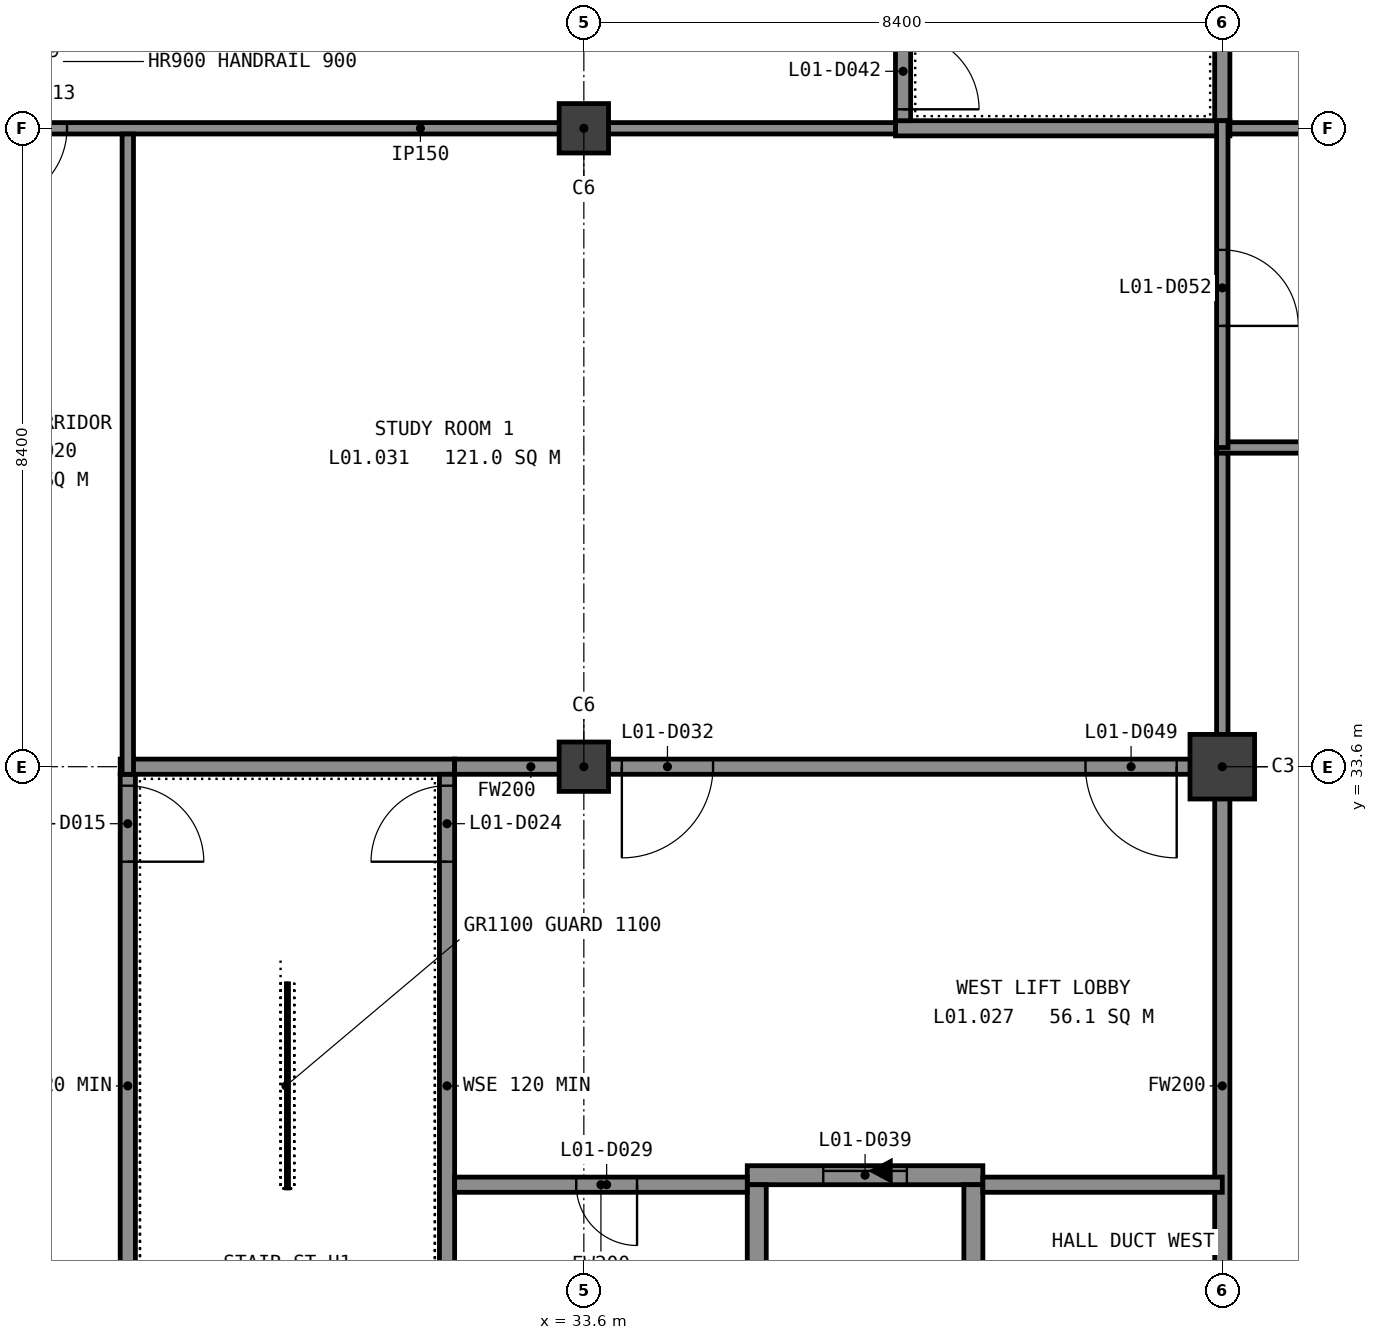
"""IFC4 building model, lengths in metres.
Left out: names, types, materials, properties, quantities, classifications, styles, units other than length and angle.
Written with IfcOpenShell. Run it as: python <this file> out.ifc"""

import sys

from ifc_helpers import new_model, si_unit, direction, frame, frame_2d, origin, origin_2d, place, context, subcontext, project, spatial, rectangle, extrude, element, fill, save


model = new_model("IFC4")
c1 = context("Model", 3, precision=1e-05, world=origin(), true_north=direction((0.0, 1.0)))
c2 = subcontext(c1, "Body", "Model", "MODEL_VIEW")
j1 = project(units=[si_unit("LENGTHUNIT", "METRE"), si_unit("PLANEANGLEUNIT", "RADIAN")], contexts=[c1])
p1 = place(None, origin())
s1 = spatial("IfcSite", under=j1, at=p1, CompositionType="ELEMENT")
p2 = place(p1, origin())
s2 = spatial("IfcBuilding", under=s1, at=p2, CompositionType="ELEMENT")
p3 = place(p2, frame((0.0, 0.0, 5.4)))
s3 = spatial("IfcBuildingStorey", under=s2, at=p3, CompositionType="ELEMENT", Elevation=5.4)
for number, where, z_axis, x_axis in (
    (1, (33.6, 33.6, -0.3), (0.0, 0.0, 1.0), (1.0, 0.0, 0.0)),
    (2, (33.6, 42.0, -0.3), (0.0, 0.0, 1.0), (1.0, 0.0, 0.0)),
):
    element("IfcColumn", number, at=place(p3, frame(where, z_axis=z_axis, x_axis=x_axis)), inside=s3, PredefinedType="COLUMN", context=c2, shape_type="SweptSolid", body=[
        extrude(rectangle(XDim=0.65, YDim=0.65, at=origin_2d()), origin(), (0.0, 0.0, 1.0), 4.55),
    ])
p4 = place(p3, frame((42.0, 33.6, -0.3), z_axis=(0.0, 0.0, 1.0), x_axis=(1.0, 0.0, 0.0)))
e3 = element("IfcColumn", 3, at=p4, inside=s3, PredefinedType="COLUMN", context=c2, shape_type="SweptSolid", body=[
    extrude(rectangle(XDim=0.85, YDim=0.85, at=origin_2d()), origin(), (0.0, 0.0, 1.0), 4.55),
])
p5 = place(p3, frame((35.75, 28.225, -0.3), z_axis=(0.0, 0.0, 1.0), x_axis=(1.0, 0.0, 0.0)))
e4 = element("IfcWall", 4, at=p5, inside=s3, PredefinedType="SHEAR", context=c2, shape_type="SweptSolid", body=[
    extrude(rectangle(XDim=3.1, YDim=0.25, at=frame_2d((1.55, 0.0))), origin(), (0.0, 0.0, 1.0), 4.55),
])
p6 = place(p5, frame((1.0, 0.0, 0.3)))
e5 = element("IfcOpeningElement", 5, at=p6, cuts=e4, PredefinedType="OPENING", context=c2, shape_type="SweptSolid", body=[
    extrude(rectangle(XDim=1.1, YDim=2.1, at=frame_2d((0.55, 1.05))), frame((0.0, 0.135, 0.0), z_axis=(0.0, -1.0, 0.0), x_axis=(1.0, 0.0, 0.0)), (0.0, 0.0, 1.0), 0.27),
])
for number, where, z_axis, x_axis in (
    (6, (35.875, 25.2, -0.3), (0.0, 0.0, 1.0), (0.0, 1.0, 0.0)),
    (7, (38.725, 25.2, -0.3), (0.0, 0.0, 1.0), (0.0, 1.0, 0.0)),
):
    element("IfcWall", number, at=place(p3, frame(where, z_axis=z_axis, x_axis=x_axis)), inside=s3, PredefinedType="SHEAR", context=c2, shape_type="SweptSolid", body=[
        extrude(rectangle(XDim=2.9, YDim=0.25, at=frame_2d((1.45, 0.0))), origin(), (0.0, 0.0, 1.0), 4.55),
    ])
p7 = place(p3, frame((27.5, 33.6, -0.3), z_axis=(0.0, 0.0, 1.0), x_axis=(1.0, 0.0, 0.0)))
e8 = element("IfcWall", 8, at=p7, inside=s3, PredefinedType="SHEAR", context=c2, shape_type="SweptSolid", body=[
    extrude(rectangle(XDim=4.4, YDim=0.2, at=frame_2d((2.2, 0.0))), origin(), (0.0, 0.0, 1.0), 4.5),
])
p8 = place(p3, frame((27.6, 25.3, -0.3), z_axis=(0.0, 0.0, 1.0), x_axis=(0.0, 1.0, 0.0)))
e9 = element("IfcWall", 9, at=p8, inside=s3, PredefinedType="SHEAR", context=c2, shape_type="SweptSolid", body=[
    extrude(rectangle(XDim=8.2, YDim=0.2, at=frame_2d((4.1, 0.0))), origin(), (0.0, 0.0, 1.0), 4.5),
])
p9 = place(p8, frame((7.05, 0.0, 0.3)))
e10 = element("IfcOpeningElement", 10, at=p9, cuts=e9, PredefinedType="OPENING", context=c2, shape_type="SweptSolid", body=[
    extrude(rectangle(XDim=1.0, YDim=2.1, at=frame_2d((0.5, 1.05))), frame((0.0, 0.11, 0.0), z_axis=(0.0, -1.0, 0.0), x_axis=(1.0, 0.0, 0.0)), (0.0, 0.0, 1.0), 0.22),
])
p10 = place(p3, frame((31.8, 25.3, -0.3), z_axis=(0.0, 0.0, 1.0), x_axis=(0.0, 1.0, 0.0)))
e11 = element("IfcWall", 11, at=p10, inside=s3, PredefinedType="SHEAR", context=c2, shape_type="SweptSolid", body=[
    extrude(rectangle(XDim=8.2, YDim=0.2, at=frame_2d((4.1, 0.0))), origin(), (0.0, 0.0, 1.0), 4.5),
])
p11 = place(p10, frame((7.05, 0.0, 0.3)))
e12 = element("IfcOpeningElement", 12, at=p11, cuts=e11, PredefinedType="OPENING", context=c2, shape_type="SweptSolid", body=[
    extrude(rectangle(XDim=1.0, YDim=2.1, at=frame_2d((0.5, 1.05))), frame((0.0, 0.11, 0.0), z_axis=(0.0, -1.0, 0.0), x_axis=(1.0, 0.0, 0.0)), (0.0, 0.0, 1.0), 0.22),
])
p12 = place(p3, frame((37.7, 42.0, -0.3), z_axis=(0.0, 0.0, 1.0), x_axis=(1.0, 0.0, 0.0)))
e13 = element("IfcWall", 13, at=p12, inside=s3, PredefinedType="SHEAR", context=c2, shape_type="SweptSolid", body=[
    extrude(rectangle(XDim=4.4, YDim=0.2, at=frame_2d((2.2, 0.0))), origin(), (0.0, 0.0, 1.0), 4.5),
])
p13 = place(p3, frame((37.8, 42.1, -0.3), z_axis=(0.0, 0.0, 1.0), x_axis=(0.0, 1.0, 0.0)))
e14 = element("IfcWall", 14, at=p13, inside=s3, PredefinedType="SHEAR", context=c2, shape_type="SweptSolid", body=[
    extrude(rectangle(XDim=7.925, YDim=0.2, at=frame_2d((3.962, 0.0))), origin(), (0.0, 0.0, 1.0), 4.5),
])
p14 = place(p13, frame((0.15, 0.0, 0.3)))
e15 = element("IfcOpeningElement", 15, at=p14, cuts=e14, PredefinedType="OPENING", context=c2, shape_type="SweptSolid", body=[
    extrude(rectangle(XDim=1.0, YDim=2.1, at=frame_2d((0.5, 1.05))), frame((0.0, 0.11, 0.0), z_axis=(0.0, -1.0, 0.0), x_axis=(1.0, 0.0, 0.0)), (0.0, 0.0, 1.0), 0.22),
])
p15 = place(p3, frame((42.0, 42.1, -0.3), z_axis=(0.0, 0.0, 1.0), x_axis=(0.0, 1.0, 0.0)))
e16 = element("IfcWall", 16, at=p15, inside=s3, PredefinedType="SHEAR", context=c2, shape_type="SweptSolid", body=[
    extrude(rectangle(XDim=7.925, YDim=0.2, at=frame_2d((3.962, 0.0))), origin(), (0.0, 0.0, 1.0), 4.5),
])
p16 = place(p3, frame((41.925, 37.8, -0.3), z_axis=(0.0, 0.0, 1.0), x_axis=(1.0, 0.0, 0.0)))
e17 = element("IfcWall", 17, at=p16, inside=s3, PredefinedType="PARTITIONING", context=c2, shape_type="SweptSolid", body=[
    extrude(rectangle(XDim=42.15, YDim=0.15, at=frame_2d((21.075, 0.0))), origin(), (0.0, 0.0, 1.0), 4.5),
])
p17 = place(p3, frame((42.1, 42.0, -0.3), z_axis=(0.0, 0.0, 1.0), x_axis=(1.0, 0.0, 0.0)))
e18 = element("IfcWall", 18, at=p17, inside=s3, PredefinedType="PARTITIONING", context=c2, shape_type="SweptSolid", body=[
    extrude(rectangle(XDim=41.9, YDim=0.15, at=frame_2d((20.95, 0.0))), origin(), (0.0, 0.0, 1.0), 4.5),
])
p18 = place(p3, frame((42.0, 25.3, -0.3), z_axis=(0.0, 0.0, 1.0), x_axis=(0.0, 1.0, 0.0)))
e19 = element("IfcWall", 19, at=p18, inside=s3, PredefinedType="SOLIDWALL", context=c2, shape_type="SweptSolid", body=[
    extrude(rectangle(XDim=8.2, YDim=0.2, at=frame_2d((4.1, 0.0))), origin(), (0.0, 0.0, 1.0), 3.9),
])
p19 = place(p3, frame((42.0, 33.7, -0.3), z_axis=(0.0, 0.0, 1.0), x_axis=(0.0, 1.0, 0.0)))
e20 = element("IfcWall", 20, at=p19, inside=s3, PredefinedType="PARTITIONING", context=c2, shape_type="SweptSolid", body=[
    extrude(rectangle(XDim=4.025, YDim=0.15, at=frame_2d((2.013, 0.0))), origin(), (0.0, 0.0, 1.0), 4.5),
])
p20 = place(p3, frame((31.9, 28.1, 0.0), z_axis=(0.0, 0.0, 1.0), x_axis=(1.0, 0.0, 0.0)))
e21 = element("IfcWall", 21, at=p20, inside=s3, PredefinedType="SOLIDWALL", context=c2, shape_type="SweptSolid", body=[
    extrude(rectangle(XDim=3.85, YDim=0.2, at=frame_2d((1.925, 0.0))), origin(), (0.0, 0.0, 1.0), 4.2),
])
p21 = place(p20, frame((1.6, 0.0, 0.0)))
e22 = element("IfcOpeningElement", 22, at=p21, cuts=e21, PredefinedType="OPENING", context=c2, shape_type="SweptSolid", body=[
    extrude(rectangle(XDim=0.8, YDim=2.1, at=frame_2d((0.4, 1.05))), frame((0.0, 0.11, 0.0), z_axis=(0.0, -1.0, 0.0), x_axis=(1.0, 0.0, 0.0)), (0.0, 0.0, 1.0), 0.22),
])
p22 = place(p3, frame((38.85, 28.1, 0.0), z_axis=(0.0, 0.0, 1.0), x_axis=(1.0, 0.0, 0.0)))
e23 = element("IfcWall", 23, at=p22, inside=s3, PredefinedType="SOLIDWALL", context=c2, shape_type="SweptSolid", body=[
    extrude(rectangle(XDim=3.15, YDim=0.2, at=frame_2d((1.575, 0.0))), origin(), (0.0, 0.0, 1.0), 4.2),
])
p23 = place(p3, frame((31.9, 33.6, 0.0), z_axis=(0.0, 0.0, 1.0), x_axis=(1.0, 0.0, 0.0)))
e24 = element("IfcWall", 24, at=p23, inside=s3, PredefinedType="SOLIDWALL", context=c2, shape_type="SweptSolid", body=[
    extrude(rectangle(XDim=2.005, YDim=0.2, at=frame_2d((1.002, 0.0))), origin(), (0.0, 0.0, 1.0), 4.2),
])
p24 = place(p3, frame((33.905, 33.6, 0.0), z_axis=(0.0, 0.0, 1.0), x_axis=(1.0, 0.0, 0.0)))
e25 = element("IfcWall", 25, at=p24, inside=s3, PredefinedType="SOLIDWALL", context=c2, shape_type="SweptSolid", body=[
    extrude(rectangle(XDim=8.095, YDim=0.2, at=frame_2d((4.047, 0.0))), origin(), (0.0, 0.0, 1.0), 3.5),
])
p25 = place(p24, frame((0.195, 0.0, 0.0)))
e26 = element("IfcOpeningElement", 26, at=p25, cuts=e25, PredefinedType="OPENING", context=c2, shape_type="SweptSolid", body=[
    extrude(rectangle(XDim=1.2, YDim=2.1, at=frame_2d((0.6, 1.05))), frame((0.0, 0.11, 0.0), z_axis=(0.0, -1.0, 0.0), x_axis=(1.0, 0.0, 0.0)), (0.0, 0.0, 1.0), 0.22),
])
p26 = place(p24, frame((6.295, 0.0, 0.0)))
e27 = element("IfcOpeningElement", 27, at=p26, cuts=e25, PredefinedType="OPENING", context=c2, shape_type="SweptSolid", body=[
    extrude(rectangle(XDim=1.2, YDim=2.1, at=frame_2d((0.6, 1.05))), frame((0.0, 0.11, 0.0), z_axis=(0.0, -1.0, 0.0), x_axis=(1.0, 0.0, 0.0)), (0.0, 0.0, 1.0), 0.22),
])
p27 = place(p3, frame((25.2, 42.0, 0.0), z_axis=(0.0, 0.0, 1.0), x_axis=(1.0, 0.0, 0.0)))
e28 = element("IfcWall", 28, at=p27, inside=s3, PredefinedType="PARTITIONING", context=c2, shape_type="SweptSolid", body=[
    extrude(rectangle(XDim=12.5, YDim=0.15, at=frame_2d((6.25, 0.0))), origin(), (0.0, 0.0, 1.0), 4.2),
])
p28 = place(p27, frame((0.6, 0.0, 0.0)))
e29 = element("IfcOpeningElement", 29, at=p28, cuts=e28, PredefinedType="OPENING", context=c2, shape_type="SweptSolid", body=[
    extrude(rectangle(XDim=1.0, YDim=2.1, at=frame_2d((0.5, 1.05))), frame((0.0, 0.085, 0.0), z_axis=(0.0, -1.0, 0.0), x_axis=(1.0, 0.0, 0.0)), (0.0, 0.0, 1.0), 0.17),
])
p29 = place(p3, frame((27.6, 33.5, 0.0), z_axis=(0.0, 0.0, 1.0), x_axis=(0.0, 1.0, 0.0)))
e30 = element("IfcWall", 30, at=p29, inside=s3, PredefinedType="PARTITIONING", context=c2, shape_type="SweptSolid", body=[
    extrude(rectangle(XDim=8.425, YDim=0.15, at=frame_2d((4.212, 0.0))), origin(), (0.0, 0.0, 1.0), 4.2),
])
p30 = place(p3, frame((42.0, 37.8, 0.0), z_axis=(0.0, 0.0, 1.0), x_axis=(0.0, 1.0, 0.0)))
e31 = element("IfcWall", 31, at=p30, inside=s3, PredefinedType="PARTITIONING", context=c2, shape_type="SweptSolid", body=[
    extrude(rectangle(XDim=4.3, YDim=0.15, at=frame_2d((2.15, 0.0))), origin(), (0.0, 0.0, 1.0), 8.7),
])
p31 = place(p30, frame((1.6, 0.0, 0.0)))
e32 = element("IfcOpeningElement", 32, at=p31, cuts=e31, PredefinedType="OPENING", context=c2, shape_type="SweptSolid", body=[
    extrude(rectangle(XDim=1.0, YDim=2.1, at=frame_2d((0.5, 1.05))), frame((0.0, 0.085, 0.0), z_axis=(0.0, -1.0, 0.0), x_axis=(1.0, 0.0, 0.0)), (0.0, 0.0, 1.0), 0.17),
])
p32 = place(p6, origin())
e33 = element("IfcDoor", 33, at=p32, inside=s3, OperationType="SLIDING_TO_LEFT", PredefinedType="DOOR", context=c2, shape_type="SweptSolid", body=[
    extrude(rectangle(XDim=1.1, YDim=2.1, at=frame_2d((0.55, 1.05))), frame((0.0, 0.025, 0.0), z_axis=(0.0, -1.0, 0.0), x_axis=(1.0, 0.0, 0.0)), (0.0, 0.0, 1.0), 0.05),
])
fill(e5, e33)
p33 = place(p9, origin())
e34 = element("IfcDoor", 34, at=p33, inside=s3, OperationType="SINGLE_SWING_LEFT", PredefinedType="DOOR", context=c2, shape_type="SweptSolid", body=[
    extrude(rectangle(XDim=1.0, YDim=2.1, at=frame_2d((0.5, 1.05))), frame((0.0, 0.025, 0.0), z_axis=(0.0, -1.0, 0.0), x_axis=(1.0, 0.0, 0.0)), (0.0, 0.0, 1.0), 0.05),
])
fill(e10, e34)
p34 = place(p11, origin())
e35 = element("IfcDoor", 35, at=p34, inside=s3, OperationType="SINGLE_SWING_RIGHT", PredefinedType="DOOR", context=c2, shape_type="SweptSolid", body=[
    extrude(rectangle(XDim=1.0, YDim=2.1, at=frame_2d((0.5, 1.05))), frame((0.0, 0.025, 0.0), z_axis=(0.0, -1.0, 0.0), x_axis=(1.0, 0.0, 0.0)), (0.0, 0.0, 1.0), 0.05),
])
fill(e12, e35)
p35 = place(p14, origin())
e36 = element("IfcDoor", 36, at=p35, inside=s3, OperationType="SINGLE_SWING_LEFT", PredefinedType="DOOR", context=c2, shape_type="SweptSolid", body=[
    extrude(rectangle(XDim=1.0, YDim=2.1, at=frame_2d((0.5, 1.05))), frame((0.0, 0.025, 0.0), z_axis=(0.0, -1.0, 0.0), x_axis=(1.0, 0.0, 0.0)), (0.0, 0.0, 1.0), 0.05),
])
fill(e15, e36)
p36 = place(p21, origin())
e37 = element("IfcDoor", 37, at=p36, inside=s3, OperationType="SINGLE_SWING_RIGHT", PredefinedType="DOOR", context=c2, shape_type="SweptSolid", body=[
    extrude(rectangle(XDim=0.8, YDim=2.1, at=frame_2d((0.4, 1.05))), frame((0.0, 0.025, 0.0), z_axis=(0.0, -1.0, 0.0), x_axis=(1.0, 0.0, 0.0)), (0.0, 0.0, 1.0), 0.05),
])
fill(e22, e37)
p37 = place(p25, origin())
e38 = element("IfcDoor", 38, at=p37, inside=s3, OperationType="SINGLE_SWING_LEFT", PredefinedType="DOOR", context=c2, shape_type="SweptSolid", body=[
    extrude(rectangle(XDim=1.2, YDim=2.1, at=frame_2d((0.6, 1.05))), frame((0.0, 0.025, 0.0), z_axis=(0.0, -1.0, 0.0), x_axis=(1.0, 0.0, 0.0)), (0.0, 0.0, 1.0), 0.05),
])
fill(e26, e38)
p38 = place(p26, origin())
e39 = element("IfcDoor", 39, at=p38, inside=s3, OperationType="SINGLE_SWING_RIGHT", PredefinedType="DOOR", context=c2, shape_type="SweptSolid", body=[
    extrude(rectangle(XDim=1.2, YDim=2.1, at=frame_2d((0.6, 1.05))), frame((0.0, 0.025, 0.0), z_axis=(0.0, -1.0, 0.0), x_axis=(1.0, 0.0, 0.0)), (0.0, 0.0, 1.0), 0.05),
])
fill(e27, e39)
p39 = place(p31, origin())
e40 = element("IfcDoor", 40, at=p39, inside=s3, OperationType="SINGLE_SWING_LEFT", PredefinedType="DOOR", context=c2, shape_type="SweptSolid", body=[
    extrude(rectangle(XDim=1.0, YDim=2.1, at=frame_2d((0.5, 1.05))), frame((0.0, 0.025, 0.0), z_axis=(0.0, -1.0, 0.0), x_axis=(1.0, 0.0, 0.0)), (0.0, 0.0, 1.0), 0.05),
])
fill(e32, e40)
p40 = place(p28, origin())
e41 = element("IfcDoor", 41, at=p40, inside=s3, OperationType="SINGLE_SWING_LEFT", PredefinedType="DOOR", context=c2, shape_type="SweptSolid", body=[
    extrude(rectangle(XDim=1.0, YDim=2.1, at=frame_2d((0.5, 1.05))), frame((0.0, 0.025, 0.0), z_axis=(0.0, -1.0, 0.0), x_axis=(1.0, 0.0, 0.0)), (0.0, 0.0, 1.0), 0.05),
])
fill(e29, e41)
save(model, sys.argv[1])
